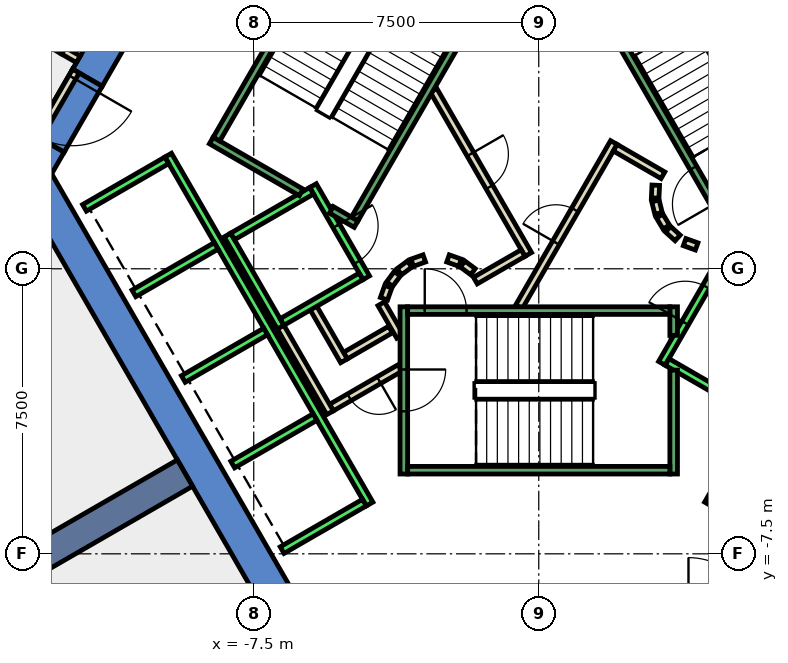
"""IFC4 building model, lengths in metres.
Left out: names, types, materials, properties, quantities, classifications, styles, units other than length and angle.
Written with IfcOpenShell. Run it as: python <this file> out.ifc"""

import sys

from ifc_helpers import new_model, si_unit, direction, frame, frame_2d, origin, place, context, subcontext, project, spatial, polyline, rectangle, outline, extrude, element, fill, save


model = new_model("IFC4")
c1 = context("Model", 3, precision=1e-05, world=origin(), true_north=direction((0.0, 1.0)))
c2 = subcontext(c1, "Body", "Model", "MODEL_VIEW")
j1 = project(units=[si_unit("LENGTHUNIT", "METRE"), si_unit("PLANEANGLEUNIT", "RADIAN")], contexts=[c1])
p1 = place(None, origin())
s1 = spatial("IfcSite", under=j1, at=p1, CompositionType="ELEMENT")
p2 = place(p1, origin())
s2 = spatial("IfcBuilding", under=s1, at=p2, CompositionType="ELEMENT")
p3 = place(p2, frame((0.0, 0.0, 111.8)))
s3 = spatial("IfcBuildingStorey", under=s2, at=p3, CompositionType="ELEMENT", Elevation=111.8)
p4 = place(p3, frame((0.0, 0.0, -0.4)))
e1 = element("IfcWall", 1, at=p4, inside=s3, PredefinedType="SHEAR", context=c2, shape_type="SweptSolid", body=[
    extrude(outline(polyline([(-12.267, 5.252), (-11.488, 4.802), (-6.409, 13.6), (-6.928, 14.5), (-12.267, 5.252)])), origin(), (0.0, 0.0, 1.0), 4.2),
])
p5 = place(p3, frame((0.0, 0.0, -0.4)))
e2 = element("IfcWall", 2, at=p5, inside=s3, PredefinedType="SHEAR", context=c2, shape_type="SweptSolid", body=[
    extrude(outline(polyline([(-12.488, 3.07), (-13.267, 3.52), (-13.856, 2.5), (-12.817, 2.5), (-12.488, 3.07)])), origin(), (0.0, 0.0, 1.0), 4.2),
])
p6 = place(p3, frame((0.0, 0.0, 3.6)))
e3 = element("IfcWall", 3, at=p6, inside=s3, PredefinedType="SHEAR", context=c2, shape_type="SweptSolid", body=[
    extrude(outline(polyline([(-13.267, 3.52), (-12.488, 3.07), (-11.488, 4.802), (-12.267, 5.252), (-13.267, 3.52)])), origin(), (0.0, 0.0, 1.0), 0.2),
])
p7 = place(p3, frame((0.0, 0.0, -0.4)))
e4 = element("IfcWall", 4, at=p7, inside=s3, PredefinedType="SHEAR", context=c2, shape_type="SweptSolid", body=[
    extrude(outline(polyline([(-13.856, 2.5), (-6.928, -9.5), (-6.409, -8.6), (-12.817, 2.5), (-13.856, 2.5)])), origin(), (0.0, 0.0, 1.0), 4.2),
])
p8 = place(p3, frame((-9.31, -5.375, -0.4), z_axis=(0.0, 0.0, 1.0), x_axis=(-0.866017533419, -0.500013631625, 0.0)))
e5 = element("IfcWall", 5, at=p8, inside=s3, PredefinedType="SHEAR", context=c2, shape_type="SweptSolid", body=[
    extrude(rectangle(XDim=9.0, YDim=0.8, at=frame_2d((4.5, 0.0))), origin(), (0.0, 0.0, 1.0), 4.2),
])
p9 = place(p3, frame((-15.532, 7.484, 0.0), z_axis=(0.0, 0.0, 1.0), x_axis=(0.866045954906, -0.499964402723, 0.0)))
e6 = element("IfcWall", 6, at=p9, inside=s3, PredefinedType="PARTITIONING", context=c2, shape_type="SweptSolid", body=[
    extrude(rectangle(XDim=3.494, YDim=0.2, at=frame_2d((1.747, 0.0))), origin(), (0.0, 0.0, 1.0), 3.8),
])
p10 = place(p3, frame((-3.9, -1.599, 0.0), z_axis=(0.0, 0.0, 1.0), x_axis=(-0.865969445389, -0.500096910261, 0.0)))
e7 = element("IfcWall", 7, at=p10, inside=s3, PredefinedType="PARTITIONING", context=c2, shape_type="SweptSolid", body=[
    extrude(rectangle(XDim=1.373, YDim=0.2, at=frame_2d((0.687, 0.0))), origin(), (0.0, 0.0, 1.0), 3.8),
])
p11 = place(p3, frame((-5.126, -2.422, 0.0), z_axis=(0.0, 0.0, 1.0), x_axis=(-0.500062241894, 0.865989465428, 0.0)))
e8 = element("IfcWall", 8, at=p11, inside=s3, PredefinedType="PARTITIONING", context=c2, shape_type="SweptSolid", body=[
    extrude(rectangle(XDim=1.7, YDim=0.2, at=frame_2d((0.85, 0.0))), origin(), (0.0, 0.0, 1.0), 3.8),
])
p12 = place(p3, frame((-3.65, -2.61, 0.0), z_axis=(0.0, 0.0, 1.0), x_axis=(-0.866072462134, -0.499918483688, 0.0)))
e9 = element("IfcWall", 9, at=p12, inside=s3, PredefinedType="PARTITIONING", context=c2, shape_type="SweptSolid", body=[
    extrude(rectangle(XDim=2.084, YDim=0.2, at=frame_2d((1.042, 0.0))), origin(), (0.0, 0.0, 1.0), 3.8),
])
p13 = place(p12, frame((0.642, 0.0, 0.0)))
e10 = element("IfcOpeningElement", 10, at=p13, cuts=e9, PredefinedType="OPENING", context=c2, shape_type="SweptSolid", body=[
    extrude(rectangle(XDim=0.9, YDim=2.1, at=frame_2d((0.45, 1.05))), frame((0.0, 0.11, 0.0), z_axis=(0.0, -1.0, 0.0), x_axis=(1.0, 0.0, 0.0)), (0.0, 0.0, 1.0), 0.22),
])
p14 = place(p3, frame((-5.492, -3.788, 0.0), z_axis=(0.0, 0.0, 1.0), x_axis=(-0.500008949224, 0.866020236886, 0.0)))
e11 = element("IfcWall", 11, at=p14, inside=s3, PredefinedType="PARTITIONING", context=c2, shape_type="SweptSolid", body=[
    extrude(rectangle(XDim=2.68, YDim=0.2, at=frame_2d((1.34, 0.0))), origin(), (0.0, 0.0, 1.0), 3.8),
])
p15 = place(p3, frame((-4.145, -0.92, 0.0), z_axis=(0.0, 0.0, 1.0), x_axis=(0.499743786207, -0.866173278362, 0.0)))
e12 = element("IfcWall", 12, at=p15, inside=s3, PredefinedType="PARTITIONING", context=c2, shape_type="SweptSolid", body=[
    extrude(rectangle(XDim=0.991, YDim=0.2, at=frame_2d((0.495, 0.0))), origin(), (0.0, 0.0, 1.0), 3.8),
])
p16 = place(p3, frame((-0.52, -1.0, 0.0), z_axis=(0.0, 0.0, 1.0), x_axis=(0.50011622646, 0.865958290007, 0.0)))
e13 = element("IfcWall", 13, at=p16, inside=s3, PredefinedType="PARTITIONING", context=c2, shape_type="SweptSolid", body=[
    extrude(rectangle(XDim=4.991, YDim=0.2, at=frame_2d((2.496, 0.0))), origin(), (0.0, 0.0, 1.0), 3.8),
])
p17 = place(p16, frame((1.945, 0.0, 0.0)))
e14 = element("IfcOpeningElement", 14, at=p17, cuts=e13, PredefinedType="OPENING", context=c2, shape_type="SweptSolid", body=[
    extrude(rectangle(XDim=1.0, YDim=2.1, at=frame_2d((0.5, 1.05))), frame((0.0, 0.11, 0.0), z_axis=(0.0, -1.0, 0.0), x_axis=(1.0, 0.0, 0.0)), (0.0, 0.0, 1.0), 0.22),
])
p18 = place(p3, frame((2.012, 3.186, 0.0), z_axis=(0.0, 0.0, 1.0), x_axis=(0.865891012941, -0.500232699559, 0.0)))
e15 = element("IfcWall", 15, at=p18, inside=s3, PredefinedType="PARTITIONING", context=c2, shape_type="SweptSolid", body=[
    extrude(rectangle(XDim=1.449, YDim=0.2, at=frame_2d((0.725, 0.0))), origin(), (0.0, 0.0, 1.0), 3.8),
])
p19 = place(p3, frame((3.079, 2.199, 0.0), z_axis=(0.0, 0.0, 1.0), x_axis=(-0.047771483479, -0.998858290933, 0.0)))
e16 = element("IfcWall", 16, at=p19, inside=s3, PredefinedType="PARTITIONING", context=c2, shape_type="SweptSolid", body=[
    extrude(rectangle(XDim=0.337, YDim=0.2, at=frame_2d((0.169, 0.0))), origin(), (0.0, 0.0, 1.0), 3.8),
])
p20 = place(p3, frame((3.07, 1.786, 0.0), z_axis=(0.0, 0.0, 1.0), x_axis=(0.242705583207, -0.970099994784, 0.0)))
e17 = element("IfcWall", 17, at=p20, inside=s3, PredefinedType="PARTITIONING", context=c2, shape_type="SweptSolid", body=[
    extrude(rectangle(XDim=0.338, YDim=0.2, at=frame_2d((0.169, 0.0))), origin(), (0.0, 0.0, 1.0), 3.8),
])
for number, where, z_axis, x_axis in (
    (18, (3.182, 1.388, 0.0), (0.0, 0.0, 1.0), (0.512, -0.859, 0.0)),
    (19, (3.404, 1.039, 0.0), (0.0, 0.0, 1.0), (0.74, -0.672, 0.0)),
):
    element("IfcWall", number, at=place(p3, frame(where, z_axis=z_axis, x_axis=x_axis)), inside=s3, PredefinedType="PARTITIONING", context=c2, shape_type="SweptSolid", body=[
        extrude(rectangle(XDim=0.338, YDim=0.2, at=frame_2d((0.169, 0.0))), origin(), (0.0, 0.0, 1.0), 3.8),
    ])
p21 = place(p3, frame((3.838, 0.702, 0.0), z_axis=(0.0, 0.0, 1.0), x_axis=(0.941035081519, -0.338308993895, 0.0)))
e20 = element("IfcWall", 20, at=p21, inside=s3, PredefinedType="PARTITIONING", context=c2, shape_type="SweptSolid", body=[
    extrude(rectangle(XDim=0.337, YDim=0.2, at=frame_2d((0.168, 0.0))), origin(), (0.0, 0.0, 1.0), 3.8),
])
p22 = place(p3, frame((-2.771, 4.7, 0.0), z_axis=(0.0, 0.0, 1.0), x_axis=(0.499969479948, -0.866043023828, 0.0)))
e21 = element("IfcWall", 21, at=p22, inside=s3, PredefinedType="PARTITIONING", context=c2, shape_type="SweptSolid", body=[
    extrude(rectangle(XDim=4.99, YDim=0.2, at=frame_2d((2.495, 0.0))), origin(), (0.0, 0.0, 1.0), 3.8),
])
p23 = place(p22, frame((1.945, 0.0, 0.0)))
e22 = element("IfcOpeningElement", 22, at=p23, cuts=e21, PredefinedType="OPENING", context=c2, shape_type="SweptSolid", body=[
    extrude(rectangle(XDim=1.0, YDim=2.1, at=frame_2d((0.5, 1.05))), frame((0.0, 0.11, 0.0), z_axis=(0.0, -1.0, 0.0), x_axis=(1.0, 0.0, 0.0)), (0.0, 0.0, 1.0), 0.22),
])
p24 = place(p3, frame((-0.412, 0.414, 0.0), z_axis=(0.0, 0.0, 1.0), x_axis=(-0.866017369001, -0.500013916395, 0.0)))
e23 = element("IfcWall", 23, at=p24, inside=s3, PredefinedType="PARTITIONING", context=c2, shape_type="SweptSolid", body=[
    extrude(rectangle(XDim=1.45, YDim=0.2, at=frame_2d((0.725, 0.0))), origin(), (0.0, 0.0, 1.0), 3.8),
])
p25 = place(p3, frame((-1.731, -0.077, 0.0), z_axis=(0.0, 0.0, 1.0), x_axis=(-0.804311165252, 0.594208338422, 0.0)))
e24 = element("IfcWall", 24, at=p25, inside=s3, PredefinedType="PARTITIONING", context=c2, shape_type="SweptSolid", body=[
    extrude(rectangle(XDim=0.338, YDim=0.2, at=frame_2d((0.169, 0.0))), origin(), (0.0, 0.0, 1.0), 3.8),
])
p26 = place(p3, frame((-2.07, 0.16, 0.0), z_axis=(0.0, 0.0, 1.0), x_axis=(-0.942199461132, 0.335052496547, 0.0)))
e25 = element("IfcWall", 25, at=p26, inside=s3, PredefinedType="PARTITIONING", context=c2, shape_type="SweptSolid", body=[
    extrude(rectangle(XDim=0.337, YDim=0.2, at=frame_2d((0.169, 0.0))), origin(), (0.0, 0.0, 1.0), 3.8),
])
p27 = place(p3, frame((-3.012, 0.273, 0.0), z_axis=(0.0, 0.0, 1.0), x_axis=(-0.942280615813, -0.334824194261, 0.0)))
e26 = element("IfcWall", 26, at=p27, inside=s3, PredefinedType="PARTITIONING", context=c2, shape_type="SweptSolid", body=[
    extrude(rectangle(XDim=0.338, YDim=0.2, at=frame_2d((0.169, 0.0))), origin(), (0.0, 0.0, 1.0), 3.8),
])
p28 = place(p3, frame((-3.397, 0.124, 0.0), z_axis=(0.0, 0.0, 1.0), x_axis=(-0.804311165252, -0.594208338422, 0.0)))
e27 = element("IfcWall", 27, at=p28, inside=s3, PredefinedType="PARTITIONING", context=c2, shape_type="SweptSolid", body=[
    extrude(rectangle(XDim=0.338, YDim=0.2, at=frame_2d((0.169, 0.0))), origin(), (0.0, 0.0, 1.0), 3.8),
])
p29 = place(p3, frame((-3.723, -0.131, 0.0), z_axis=(0.0, 0.0, 1.0), x_axis=(-0.594675113454, -0.803966112121, 0.0)))
e28 = element("IfcWall", 28, at=p29, inside=s3, PredefinedType="PARTITIONING", context=c2, shape_type="SweptSolid", body=[
    extrude(rectangle(XDim=0.338, YDim=0.2, at=frame_2d((0.169, 0.0))), origin(), (0.0, 0.0, 1.0), 3.8),
])
p30 = place(p3, frame((-3.96, -0.47, 0.0), z_axis=(0.0, 0.0, 1.0), x_axis=(-0.334824194261, -0.942280615813, 0.0)))
e29 = element("IfcWall", 29, at=p30, inside=s3, PredefinedType="PARTITIONING", context=c2, shape_type="SweptSolid", body=[
    extrude(rectangle(XDim=0.338, YDim=0.2, at=frame_2d((0.169, 0.0))), origin(), (0.0, 0.0, 1.0), 3.8),
])
p31 = place(p3, frame((-12.18, 5.202, 0.0), z_axis=(0.0, 0.0, 1.0), x_axis=(-0.50002537861, -0.866010750942, 0.0)))
e30 = element("IfcWall", 30, at=p31, inside=s3, PredefinedType="PARTITIONING", context=c2, shape_type="SweptSolid", body=[
    extrude(rectangle(XDim=2.0, YDim=0.2, at=frame_2d((1.0, 0.0))), origin(), (0.0, 0.0, 1.0), 2.4),
])
p32 = place(p31, frame((0.19, 0.0, 0.0)))
e31 = element("IfcOpeningElement", 31, at=p32, cuts=e30, PredefinedType="OPENING", context=c2, shape_type="SweptSolid", body=[
    extrude(rectangle(XDim=1.8, YDim=2.1, at=frame_2d((0.9, 1.05))), frame((0.0, 0.11, 0.0), z_axis=(0.0, -1.0, 0.0), x_axis=(1.0, 0.0, 0.0)), (0.0, 0.0, 1.0), 0.22),
])
p33 = place(p3, frame((-12.506, 5.737, 0.0), z_axis=(0.0, 0.0, 1.0), x_axis=(0.865624510465, -0.500693725627, 0.0)))
e32 = element("IfcWall", 32, at=p33, inside=s3, PredefinedType="PARTITIONING", context=c2, shape_type="SweptSolid", body=[
    extrude(rectangle(XDim=0.449, YDim=0.2, at=frame_2d((0.225, 0.0))), origin(), (0.0, 0.0, 1.0), 2.4),
])
p34 = place(p3, frame((-5.94, 2.188, 0.0), z_axis=(0.0, 0.0, 1.0), x_axis=(0.49994636267, -0.866056369097, 0.0)))
e33 = element("IfcWall", 33, at=p34, inside=s3, PredefinedType="STANDARD", context=c2, shape_type="SweptSolid", body=[
    extrude(rectangle(XDim=2.8, YDim=0.2, at=frame_2d((1.4, 0.0))), origin(), (0.0, 0.0, 1.0), 3.8),
])
p35 = place(p34, frame((1.225, 0.0, 0.0)))
e34 = element("IfcOpeningElement", 34, at=p35, cuts=e33, PredefinedType="OPENING", context=c2, shape_type="SweptSolid", body=[
    extrude(rectangle(XDim=1.1, YDim=2.1, at=frame_2d((0.55, 1.05))), frame((0.0, 0.11, 0.0), z_axis=(0.0, -1.0, 0.0), x_axis=(1.0, 0.0, 0.0)), (0.0, 0.0, 1.0), 0.22),
])
p36 = place(p3, frame((-8.192, 0.888, 0.0), z_axis=(0.0, 0.0, 1.0), x_axis=(0.49994636267, -0.866056369097, 0.0)))
e35 = element("IfcWall", 35, at=p36, inside=s3, PredefinedType="STANDARD", context=c2, shape_type="SweptSolid", body=[
    extrude(rectangle(XDim=2.8, YDim=0.2, at=frame_2d((1.4, 0.0))), origin(), (0.0, 0.0, 1.0), 3.8),
])
for number, where, z_axis, x_axis in (
    (36, (-5.977, 2.052, 0.0), (0.0, 0.0, 1.0), (-0.866, -0.5, 0.0)),
    (37, (-4.677, -0.2, 0.0), (0.0, 0.0, 1.0), (-0.866, -0.5, 0.0)),
):
    element("IfcWall", number, at=place(p3, frame(where, z_axis=z_axis, x_axis=x_axis)), inside=s3, PredefinedType="STANDARD", context=c2, shape_type="SweptSolid", body=[
        extrude(rectangle(XDim=2.399, YDim=0.2, at=frame_2d((1.2, 0.0))), origin(), (0.0, 0.0, 1.0), 3.8),
    ])
p37 = place(p3, frame((-9.751, 2.99, 0.0), z_axis=(0.0, 0.0, 1.0), x_axis=(0.50000090737, -0.866024879913, 0.0)))
e38 = element("IfcWall", 38, at=p37, inside=s3, PredefinedType="STANDARD", context=c2, shape_type="SweptSolid", body=[
    extrude(rectangle(XDim=10.6, YDim=0.2, at=frame_2d((5.3, 0.0))), origin(), (0.0, 0.0, 1.0), 3.8),
])
p38 = place(p3, frame((-9.788, 2.853, 0.0), z_axis=(0.0, 0.0, 1.0), x_axis=(-0.865998541277, -0.500046524342, 0.0)))
e39 = element("IfcWall", 39, at=p38, inside=s3, PredefinedType="STANDARD", context=c2, shape_type="SweptSolid", body=[
    extrude(rectangle(XDim=2.5, YDim=0.2, at=frame_2d((1.25, 0.0))), origin(), (0.0, 0.0, 1.0), 3.8),
])
for number, where, z_axis, x_axis in (
    (40, (-8.488, 0.602, 0.0), (0.0, 0.0, 1.0), (-0.866, -0.5, 0.0)),
    (41, (-7.188, -1.65, 0.0), (0.0, 0.0, 1.0), (-0.866, -0.5, 0.0)),
    (42, (-5.888, -3.902, 0.0), (0.0, 0.0, 1.0), (-0.866, -0.5, 0.0)),
    (43, (-4.588, -6.153, 0.0), (0.0, 0.0, 1.0), (-0.866, -0.5, 0.0)),
):
    element("IfcWall", number, at=place(p3, frame(where, z_axis=z_axis, x_axis=x_axis)), inside=s3, PredefinedType="STANDARD", context=c2, shape_type="SweptSolid", body=[
        extrude(rectangle(XDim=2.5, YDim=0.2, at=frame_2d((1.25, 0.0))), origin(), (0.0, 0.0, 1.0), 3.8),
    ])
p39 = place(p3, frame((3.24, -2.488, 0.0), z_axis=(0.0, 0.0, 1.0), x_axis=(0.49994636267, 0.866056369097, 0.0)))
e44 = element("IfcWall", 44, at=p39, inside=s3, PredefinedType="STANDARD", context=c2, shape_type="SweptSolid", body=[
    extrude(rectangle(XDim=2.8, YDim=0.2, at=frame_2d((1.4, 0.0))), origin(), (0.0, 0.0, 1.0), 3.8),
])
p40 = place(p39, frame((1.225, 0.0, 0.0)))
e45 = element("IfcOpeningElement", 45, at=p40, cuts=e44, PredefinedType="OPENING", context=c2, shape_type="SweptSolid", body=[
    extrude(rectangle(XDim=1.1, YDim=2.1, at=frame_2d((0.55, 1.05))), frame((0.0, 0.11, 0.0), z_axis=(0.0, -1.0, 0.0), x_axis=(1.0, 0.0, 0.0)), (0.0, 0.0, 1.0), 0.22),
])
p41 = place(p3, frame((3.377, -2.452, 0.0), z_axis=(0.0, 0.0, 1.0), x_axis=(0.865955154139, -0.50012165622, 0.0)))
e46 = element("IfcWall", 46, at=p41, inside=s3, PredefinedType="STANDARD", context=c2, shape_type="SweptSolid", body=[
    extrude(rectangle(XDim=2.4, YDim=0.2, at=frame_2d((1.2, 0.0))), origin(), (0.0, 0.0, 1.0), 3.8),
])
p42 = place(p3, frame((4.451, -6.19, 0.0), z_axis=(0.0, 0.0, 1.0), x_axis=(0.50000090737, 0.866024879913, 0.0)))
e47 = element("IfcWall", 47, at=p42, inside=s3, PredefinedType="STANDARD", context=c2, shape_type="SweptSolid", body=[
    extrude(rectangle(XDim=10.6, YDim=0.2, at=frame_2d((5.3, 0.0))), origin(), (0.0, 0.0, 1.0), 3.8),
])
p43 = place(p3, frame((-3.55, -1.0, 0.0), z_axis=(0.0, 0.0, 1.0), x_axis=(0.0, -1.0, 0.0)))
e48 = element("IfcWall", 48, at=p43, inside=s3, PredefinedType="STANDARD", context=c2, shape_type="SweptSolid", body=[
    extrude(rectangle(XDim=4.4, YDim=0.2, at=frame_2d((2.2, 0.0))), origin(), (0.0, 0.0, 1.0), 3.8),
])
p44 = place(p43, frame((1.65, 0.0, 0.0)))
e49 = element("IfcOpeningElement", 49, at=p44, cuts=e48, PredefinedType="OPENING", context=c2, shape_type="SweptSolid", body=[
    extrude(rectangle(XDim=1.1, YDim=2.2, at=frame_2d((0.55, 1.1))), frame((0.0, 0.11, 0.0), z_axis=(0.0, -1.0, 0.0), x_axis=(1.0, 0.0, 0.0)), (0.0, 0.0, 1.0), 0.22),
])
p45 = place(p3, frame((3.55, -2.667, 0.0), z_axis=(0.0, 0.0, 1.0), x_axis=(0.0, -1.0, 0.0)))
e50 = element("IfcWall", 50, at=p45, inside=s3, PredefinedType="STANDARD", context=c2, shape_type="SweptSolid", body=[
    extrude(rectangle(XDim=2.733, YDim=0.2, at=frame_2d((1.366, 0.0))), origin(), (0.0, 0.0, 1.0), 3.8),
])
p46 = place(p3, frame((3.55, -1.0, 0.0), z_axis=(0.0, 0.0, 1.0), x_axis=(0.0, -1.0, 0.0)))
e51 = element("IfcWall", 51, at=p46, inside=s3, PredefinedType="STANDARD", context=c2, shape_type="SweptSolid", body=[
    extrude(rectangle(XDim=0.751, YDim=0.2, at=frame_2d((0.375, 0.0))), origin(), (0.0, 0.0, 1.0), 3.8),
])
p47 = place(p3, frame((-3.45, -1.1, 0.0), z_axis=(0.0, 0.0, 1.0), x_axis=(1.0, 0.0, 0.0)))
e52 = element("IfcWall", 52, at=p47, inside=s3, PredefinedType="STANDARD", context=c2, shape_type="SweptSolid", body=[
    extrude(rectangle(XDim=6.9, YDim=0.2, at=frame_2d((3.45, 0.0))), origin(), (0.0, 0.0, 1.0), 3.8),
])
p48 = place(p47, frame((0.45, 0.0, 0.0)))
e53 = element("IfcOpeningElement", 53, at=p48, cuts=e52, PredefinedType="OPENING", context=c2, shape_type="SweptSolid", body=[
    extrude(rectangle(XDim=1.1, YDim=2.2, at=frame_2d((0.55, 1.1))), frame((0.0, 0.11, 0.0), z_axis=(0.0, -1.0, 0.0), x_axis=(1.0, 0.0, 0.0)), (0.0, 0.0, 1.0), 0.22),
])
p49 = place(p3, frame((-3.45, -5.3, 0.0), z_axis=(0.0, 0.0, 1.0), x_axis=(1.0, 0.0, 0.0)))
e54 = element("IfcWall", 54, at=p49, inside=s3, PredefinedType="STANDARD", context=c2, shape_type="SweptSolid", body=[
    extrude(rectangle(XDim=6.9, YDim=0.2, at=frame_2d((3.45, 0.0))), origin(), (0.0, 0.0, 1.0), 3.8),
])
p50 = place(p3, frame((4.843, 1.312, 0.0), z_axis=(0.0, 0.0, 1.0), x_axis=(-0.499963383562, 0.866046543262, 0.0)))
e55 = element("IfcWall", 55, at=p50, inside=s3, PredefinedType="STANDARD", context=c2, shape_type="SweptSolid", body=[
    extrude(rectangle(XDim=6.9, YDim=0.2, at=frame_2d((3.45, 0.0))), origin(), (0.0, 0.0, 1.0), 3.8),
])
p51 = place(p50, frame((0.45, 0.0, 0.0)))
e56 = element("IfcOpeningElement", 56, at=p51, cuts=e55, PredefinedType="OPENING", context=c2, shape_type="SweptSolid", body=[
    extrude(rectangle(XDim=1.1, YDim=2.2, at=frame_2d((0.55, 1.1))), frame((0.0, 0.11, 0.0), z_axis=(0.0, -1.0, 0.0), x_axis=(1.0, 0.0, 0.0)), (0.0, 0.0, 1.0), 0.22),
])
p52 = place(p3, frame((-6.25, 2.01, 0.0), z_axis=(0.0, 0.0, 1.0), x_axis=(-0.86611865017, 0.499838457731, 0.0)))
e57 = element("IfcWall", 57, at=p52, inside=s3, PredefinedType="STANDARD", context=c2, shape_type="SweptSolid", body=[
    extrude(rectangle(XDim=2.733, YDim=0.2, at=frame_2d((1.366, 0.0))), origin(), (0.0, 0.0, 1.0), 3.8),
])
p53 = place(p3, frame((-4.806, 1.176, 0.0), z_axis=(0.0, 0.0, 1.0), x_axis=(-0.866558586415, 0.499075361355, 0.0)))
e58 = element("IfcWall", 58, at=p53, inside=s3, PredefinedType="STANDARD", context=c2, shape_type="SweptSolid", body=[
    extrude(rectangle(XDim=0.751, YDim=0.2, at=frame_2d((0.376, 0.0))), origin(), (0.0, 0.0, 1.0), 3.8),
])
p54 = place(p3, frame((-1.393, 7.288, 0.0), z_axis=(0.0, 0.0, 1.0), x_axis=(-0.499963383562, -0.866046543262, 0.0)))
e59 = element("IfcWall", 59, at=p54, inside=s3, PredefinedType="STANDARD", context=c2, shape_type="SweptSolid", body=[
    extrude(rectangle(XDim=6.9, YDim=0.2, at=frame_2d((3.45, 0.0))), origin(), (0.0, 0.0, 1.0), 3.8),
])
p55 = place(p54, frame((0.45, 0.0, 0.0)))
e60 = element("IfcOpeningElement", 60, at=p55, cuts=e59, PredefinedType="OPENING", context=c2, shape_type="SweptSolid", body=[
    extrude(rectangle(XDim=1.1, YDim=2.2, at=frame_2d((0.55, 1.1))), frame((0.0, 0.11, 0.0), z_axis=(0.0, -1.0, 0.0), x_axis=(1.0, 0.0, 0.0)), (0.0, 0.0, 1.0), 0.22),
])
p56 = place(p3, frame((-5.03, 9.388, 0.0), z_axis=(0.0, 0.0, 1.0), x_axis=(-0.499978703459, -0.866037698999, 0.0)))
e61 = element("IfcWall", 61, at=p56, inside=s3, PredefinedType="STANDARD", context=c2, shape_type="SweptSolid", body=[
    extrude(rectangle(XDim=6.9, YDim=0.2, at=frame_2d((3.45, 0.0))), origin(), (0.0, 0.0, 1.0), 3.8),
])
p57 = place(p17, origin())
e62 = element("IfcDoor", 62, at=p57, inside=s3, OperationType="SINGLE_SWING_LEFT", PredefinedType="DOOR", context=c2, shape_type="SweptSolid", body=[
    extrude(rectangle(XDim=1.0, YDim=2.1, at=frame_2d((0.5, 1.05))), frame((0.0, 0.025, 0.0), z_axis=(0.0, -1.0, 0.0), x_axis=(1.0, 0.0, 0.0)), (0.0, 0.0, 1.0), 0.05),
])
fill(e14, e62)
p58 = place(p23, origin())
e63 = element("IfcDoor", 63, at=p58, inside=s3, OperationType="SINGLE_SWING_RIGHT", PredefinedType="DOOR", context=c2, shape_type="SweptSolid", body=[
    extrude(rectangle(XDim=1.0, YDim=2.1, at=frame_2d((0.5, 1.05))), frame((0.0, 0.025, 0.0), z_axis=(0.0, -1.0, 0.0), x_axis=(1.0, 0.0, 0.0)), (0.0, 0.0, 1.0), 0.05),
])
fill(e22, e63)
p59 = place(p13, origin())
e64 = element("IfcDoor", 64, at=p59, inside=s3, OperationType="SINGLE_SWING_LEFT", PredefinedType="DOOR", context=c2, shape_type="SweptSolid", body=[
    extrude(rectangle(XDim=0.9, YDim=2.1, at=frame_2d((0.45, 1.05))), frame((0.0, 0.025, 0.0), z_axis=(0.0, -1.0, 0.0), x_axis=(1.0, 0.0, 0.0)), (0.0, 0.0, 1.0), 0.05),
])
fill(e10, e64)
p60 = place(p32, origin())
e65 = element("IfcDoor", 65, at=p60, inside=s3, OperationType="DOUBLE_DOOR_SINGLE_SWING", PredefinedType="DOOR", context=c2, shape_type="SweptSolid", body=[
    extrude(rectangle(XDim=1.8, YDim=2.1, at=frame_2d((0.9, 1.05))), frame((0.0, 0.025, 0.0), z_axis=(0.0, -1.0, 0.0), x_axis=(1.0, 0.0, 0.0)), (0.0, 0.0, 1.0), 0.05),
])
fill(e31, e65)
p61 = place(p40, origin())
e66 = element("IfcDoor", 66, at=p61, inside=s3, OperationType="SLIDING_TO_LEFT", PredefinedType="DOOR", context=c2, shape_type="SweptSolid", body=[
    extrude(rectangle(XDim=1.1, YDim=2.1, at=frame_2d((0.55, 1.05))), frame((0.0, 0.025, 0.0), z_axis=(0.0, -1.0, 0.0), x_axis=(1.0, 0.0, 0.0)), (0.0, 0.0, 1.0), 0.05),
])
fill(e45, e66)
p62 = place(p35, origin())
e67 = element("IfcDoor", 67, at=p62, inside=s3, OperationType="SLIDING_TO_LEFT", PredefinedType="DOOR", context=c2, shape_type="SweptSolid", body=[
    extrude(rectangle(XDim=1.1, YDim=2.1, at=frame_2d((0.55, 1.05))), frame((0.0, 0.025, 0.0), z_axis=(0.0, -1.0, 0.0), x_axis=(1.0, 0.0, 0.0)), (0.0, 0.0, 1.0), 0.05),
])
fill(e34, e67)
p63 = place(p48, origin())
e68 = element("IfcDoor", 68, at=p63, inside=s3, OperationType="SINGLE_SWING_LEFT", PredefinedType="DOOR", context=c2, shape_type="SweptSolid", body=[
    extrude(rectangle(XDim=1.1, YDim=2.2, at=frame_2d((0.55, 1.1))), frame((0.0, 0.025, 0.0), z_axis=(0.0, -1.0, 0.0), x_axis=(1.0, 0.0, 0.0)), (0.0, 0.0, 1.0), 0.05),
])
fill(e53, e68)
p64 = place(p44, origin())
e69 = element("IfcDoor", 69, at=p64, inside=s3, OperationType="SINGLE_SWING_LEFT", PredefinedType="DOOR", context=c2, shape_type="SweptSolid", body=[
    extrude(rectangle(XDim=1.1, YDim=2.2, at=frame_2d((0.55, 1.1))), frame((0.0, 0.025, 0.0), z_axis=(0.0, -1.0, 0.0), x_axis=(1.0, 0.0, 0.0)), (0.0, 0.0, 1.0), 0.05),
])
fill(e49, e69)
p65 = place(p51, origin())
e70 = element("IfcDoor", 70, at=p65, inside=s3, OperationType="SINGLE_SWING_LEFT", PredefinedType="DOOR", context=c2, shape_type="SweptSolid", body=[
    extrude(rectangle(XDim=1.1, YDim=2.2, at=frame_2d((0.55, 1.1))), frame((0.0, 0.025, 0.0), z_axis=(0.0, -1.0, 0.0), x_axis=(1.0, 0.0, 0.0)), (0.0, 0.0, 1.0), 0.05),
])
fill(e56, e70)
save(model, sys.argv[1])
